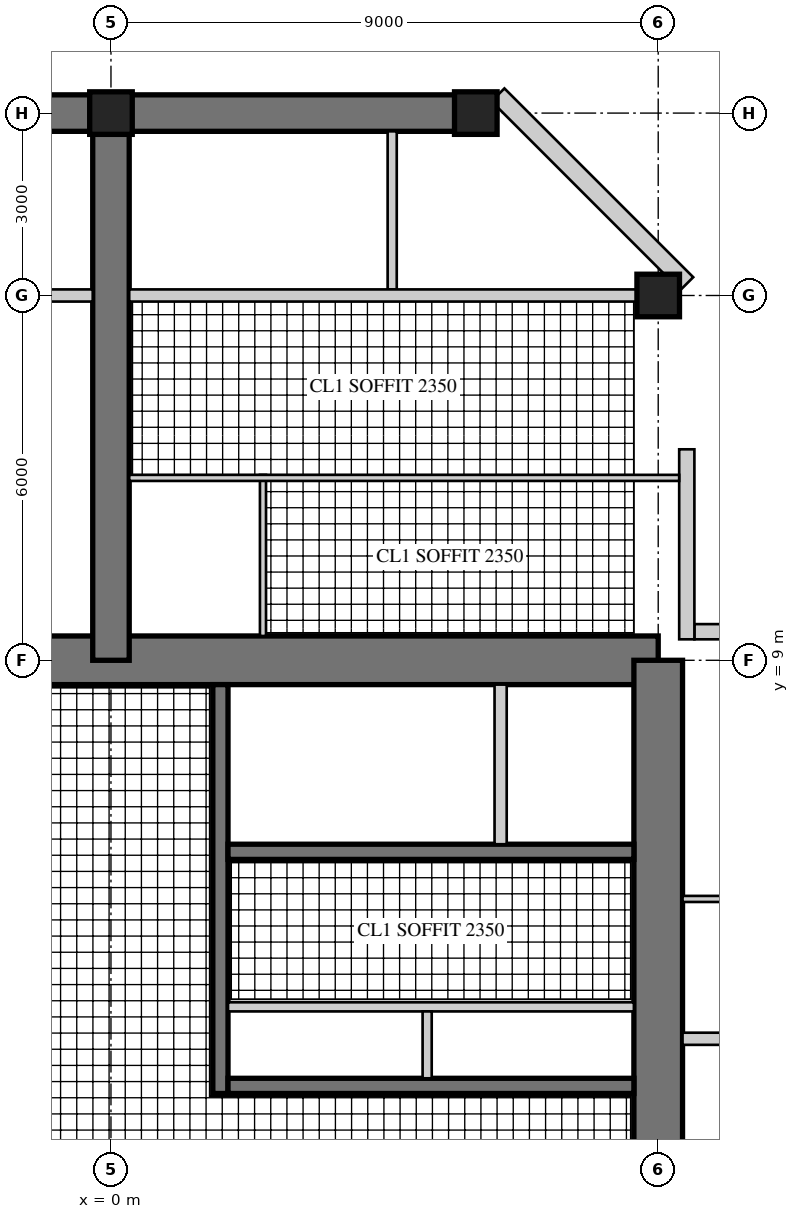
"""IFC4 building model, lengths in metres.
Left out: names, types, materials, properties, quantities, classifications, styles, units other than length and angle.
Written with IfcOpenShell. Run it as: python <this file> out.ifc"""

import sys

from ifc_helpers import new_model, si_unit, direction, frame, frame_2d, origin, origin_2d, place, context, subcontext, project, spatial, rectangle, hollow_rectangle, extrude, element, fill, save


model = new_model("IFC4")
c1 = context("Model", 3, precision=1e-05, world=origin(), true_north=direction((0.0, 1.0)))
c2 = subcontext(c1, "Body", "Model", "MODEL_VIEW")
j1 = project(units=[si_unit("LENGTHUNIT", "METRE"), si_unit("PLANEANGLEUNIT", "RADIAN")], contexts=[c1])
p1 = place(None, origin())
s1 = spatial("IfcSite", under=j1, at=p1, CompositionType="ELEMENT")
p2 = place(p1, origin())
s2 = spatial("IfcBuilding", under=s1, at=p2, CompositionType="ELEMENT")
p3 = place(p2, frame((0.0, 0.0, 278.1)))
s3 = spatial("IfcBuildingStorey", under=s2, at=p3, CompositionType="ELEMENT", Elevation=278.1)
p4 = place(p3, frame((9.0, 9.0, 0.0), z_axis=(0.0, 0.0, 1.0), x_axis=(-1.0, 0.0, 0.0)))
e1 = element("IfcWall", 1, at=p4, inside=s3, PredefinedType="SHEAR", context=c2, shape_type="SweptSolid", body=[
    extrude(rectangle(XDim=18.0, YDim=0.8, at=frame_2d((9.0, 0.0))), origin(), (0.0, 0.0, 1.0), 3.4),
])
p5 = place(p4, frame((9.8, 0.0, 0.0)))
e2 = element("IfcOpeningElement", 2, at=p5, cuts=e1, PredefinedType="OPENING", context=c2, shape_type="SweptSolid", body=[
    extrude(rectangle(XDim=1.0, YDim=2.4, at=frame_2d((0.5, 1.2))), frame((0.0, 0.41, 0.0), z_axis=(0.0, -1.0, 0.0), x_axis=(1.0, 0.0, 0.0)), (0.0, 0.0, 1.0), 0.82),
])
p6 = place(p3, frame((9.0, -9.0, 0.0), z_axis=(0.0, 0.0, 1.0), x_axis=(0.0, 1.0, 0.0)))
e3 = element("IfcWall", 3, at=p6, inside=s3, PredefinedType="SHEAR", context=c2, shape_type="SweptSolid", body=[
    extrude(rectangle(XDim=18.0, YDim=0.8, at=frame_2d((9.0, 0.0))), origin(), (0.0, 0.0, 1.0), 3.4),
])
p7 = place(p6, frame((9.8, 0.0, 0.0)))
e4 = element("IfcOpeningElement", 4, at=p7, cuts=e3, PredefinedType="OPENING", context=c2, shape_type="SweptSolid", body=[
    extrude(rectangle(XDim=1.0, YDim=2.4, at=frame_2d((0.5, 1.2))), frame((0.0, 0.41, 0.0), z_axis=(0.0, -1.0, 0.0), x_axis=(1.0, 0.0, 0.0)), (0.0, 0.0, 1.0), 0.82),
])
p8 = place(p3, frame((1.8, 1.875, 0.0), z_axis=(0.0, 0.0, 1.0), x_axis=(0.0, 1.0, 0.0)))
e5 = element("IfcWall", 5, at=p8, inside=s3, PredefinedType="SHEAR", context=c2, shape_type="SweptSolid", body=[
    extrude(rectangle(XDim=6.725, YDim=0.25, at=frame_2d((3.363, 0.0))), origin(), (0.0, 0.0, 1.0), 3.4),
])
p9 = place(p8, frame((1.875, 0.0, 0.0)))
e6 = element("IfcOpeningElement", 6, at=p9, cuts=e5, PredefinedType="OPENING", context=c2, shape_type="SweptSolid", body=[
    extrude(rectangle(XDim=1.6, YDim=2.4, at=frame_2d((0.8, 1.2))), frame((0.0, 0.135, 0.0), z_axis=(0.0, -1.0, 0.0), x_axis=(1.0, 0.0, 0.0)), (0.0, 0.0, 1.0), 0.27),
])
p10 = place(p3, frame((1.925, 2.0, 0.0), z_axis=(0.0, 0.0, 1.0), x_axis=(1.0, 0.0, 0.0)))
e7 = element("IfcWall", 7, at=p10, inside=s3, PredefinedType="SHEAR", context=c2, shape_type="SweptSolid", body=[
    extrude(rectangle(XDim=6.675, YDim=0.25, at=frame_2d((3.337, 0.0))), origin(), (0.0, 0.0, 1.0), 3.4),
])
p11 = place(p3, frame((1.925, 5.85, 0.0), z_axis=(0.0, 0.0, 1.0), x_axis=(1.0, 0.0, 0.0)))
e8 = element("IfcWall", 8, at=p11, inside=s3, PredefinedType="SHEAR", context=c2, shape_type="SweptSolid", body=[
    extrude(rectangle(XDim=6.675, YDim=0.25, at=frame_2d((3.337, 0.0))), origin(), (0.0, 0.0, 1.0), 3.4),
])
p12 = place(p11, frame((0.546, 0.0, 0.0)))
e9 = element("IfcOpeningElement", 9, at=p12, cuts=e8, PredefinedType="OPENING", context=c2, shape_type="SweptSolid", body=[
    extrude(rectangle(XDim=1.0, YDim=2.1, at=frame_2d((0.5, 1.05))), frame((0.0, 0.135, 0.0), z_axis=(0.0, -1.0, 0.0), x_axis=(1.0, 0.0, 0.0)), (0.0, 0.0, 1.0), 0.27),
])
p13 = place(p11, frame((5.129, 0.0, 0.0)))
e10 = element("IfcOpeningElement", 10, at=p13, cuts=e8, PredefinedType="OPENING", context=c2, shape_type="SweptSolid", body=[
    extrude(rectangle(XDim=1.0, YDim=2.1, at=frame_2d((0.5, 1.05))), frame((0.0, 0.135, 0.0), z_axis=(0.0, -1.0, 0.0), x_axis=(1.0, 0.0, 0.0)), (0.0, 0.0, 1.0), 0.27),
])
p14 = place(p3, frame((1.925, 3.3, 0.0), z_axis=(0.0, 0.0, 1.0), x_axis=(1.0, 0.0, 0.0)))
e11 = element("IfcWall", 11, at=p14, inside=s3, PredefinedType="PARTITIONING", context=c2, shape_type="SweptSolid", body=[
    extrude(rectangle(XDim=6.675, YDim=0.15, at=frame_2d((3.337, 0.0))), origin(), (0.0, 0.0, 1.0), 3.4),
])
p15 = place(p14, frame((0.075, 0.0, 0.0)))
e12 = element("IfcOpeningElement", 12, at=p15, cuts=e11, PredefinedType="OPENING", context=c2, shape_type="SweptSolid", body=[
    extrude(rectangle(XDim=0.8, YDim=2.1, at=frame_2d((0.4, 1.05))), frame((0.0, 0.085, 0.0), z_axis=(0.0, -1.0, 0.0), x_axis=(1.0, 0.0, 0.0)), (0.0, 0.0, 1.0), 0.17),
])
p16 = place(p14, frame((3.675, 0.0, 0.0)))
e13 = element("IfcOpeningElement", 13, at=p16, cuts=e11, PredefinedType="OPENING", context=c2, shape_type="SweptSolid", body=[
    extrude(rectangle(XDim=0.8, YDim=2.1, at=frame_2d((0.4, 1.05))), frame((0.0, 0.085, 0.0), z_axis=(0.0, -1.0, 0.0), x_axis=(1.0, 0.0, 0.0)), (0.0, 0.0, 1.0), 0.17),
])
p17 = place(p3, frame((5.2, 2.125, 0.0), z_axis=(0.0, 0.0, 1.0), x_axis=(0.0, 1.0, 0.0)))
e14 = element("IfcWall", 14, at=p17, inside=s3, PredefinedType="PARTITIONING", context=c2, shape_type="SweptSolid", body=[
    extrude(rectangle(XDim=1.1, YDim=0.15, at=frame_2d((0.55, 0.0))), origin(), (0.0, 0.0, 1.0), 3.4),
])
p18 = place(p3, frame((6.408, 5.975, 0.0), z_axis=(0.0, 0.0, 1.0), x_axis=(0.0, 1.0, 0.0)))
e15 = element("IfcWall", 15, at=p18, inside=s3, PredefinedType="PARTITIONING", context=c2, shape_type="SweptSolid", body=[
    extrude(rectangle(XDim=2.625, YDim=0.2, at=frame_2d((1.312, 0.0))), origin(), (0.0, 0.0, 1.0), 3.4),
])
p19 = place(p3, frame((0.0, 9.0, 0.0), z_axis=(0.0, 0.0, 1.0), x_axis=(0.0, 1.0, 0.0)))
e16 = element("IfcWall", 16, at=p19, inside=s3, PredefinedType="SHEAR", context=c2, shape_type="SweptSolid", body=[
    extrude(rectangle(XDim=9.0, YDim=0.6, at=frame_2d((4.5, 0.0))), origin(), (0.0, 0.0, 1.0), 3.4),
])
p20 = place(p19, frame((3.8, 0.0, 0.0)))
e17 = element("IfcOpeningElement", 17, at=p20, cuts=e16, PredefinedType="OPENING", context=c2, shape_type="SweptSolid", body=[
    extrude(rectangle(XDim=1.0, YDim=2.15, at=frame_2d((0.5, 1.075))), frame((0.0, 0.31, 0.0), z_axis=(0.0, -1.0, 0.0), x_axis=(1.0, 0.0, 0.0)), (0.0, 0.0, 1.0), 0.62),
])
p21 = place(p19, frame((7.0, 0.0, 0.0)))
e18 = element("IfcOpeningElement", 18, at=p21, cuts=e16, PredefinedType="OPENING", context=c2, shape_type="SweptSolid", body=[
    extrude(rectangle(XDim=1.0, YDim=2.2, at=frame_2d((0.5, 1.1))), frame((0.0, 0.31, 0.0), z_axis=(0.0, -1.0, 0.0), x_axis=(1.0, 0.0, 0.0)), (0.0, 0.0, 1.0), 0.62),
])
p22 = place(p3, frame((6.0, 18.0, 0.0), z_axis=(0.0, 0.0, 1.0), x_axis=(-1.0, 0.0, 0.0)))
e19 = element("IfcWall", 19, at=p22, inside=s3, PredefinedType="SHEAR", context=c2, shape_type="SweptSolid", body=[
    extrude(rectangle(XDim=12.0, YDim=0.6, at=frame_2d((6.0, 0.0))), origin(), (0.0, 0.0, 1.0), 3.4),
])
p23 = place(p22, frame((1.625, 0.0, 0.6)))
e20 = element("IfcOpeningElement", 20, at=p23, cuts=e19, PredefinedType="OPENING", context=c2, shape_type="SweptSolid", body=[
    extrude(rectangle(XDim=3.0, YDim=2.4, at=frame_2d((1.5, 1.2))), frame((0.0, 0.31, 0.0), z_axis=(0.0, -1.0, 0.0), x_axis=(1.0, 0.0, 0.0)), (0.0, 0.0, 1.0), 0.62),
])
p24 = place(p22, frame((7.375, 0.0, 0.6)))
e21 = element("IfcOpeningElement", 21, at=p24, cuts=e19, PredefinedType="OPENING", context=c2, shape_type="SweptSolid", body=[
    extrude(rectangle(XDim=3.0, YDim=2.4, at=frame_2d((1.5, 1.2))), frame((0.0, 0.31, 0.0), z_axis=(0.0, -1.0, 0.0), x_axis=(1.0, 0.0, 0.0)), (0.0, 0.0, 1.0), 0.62),
])
for number, where, z_axis, x_axis in (
    (22, (9.0, 15.0, 0.0), (0.0, 0.0, 1.0), (1.0, 0.0, 0.0)),
    (23, (6.0, 18.0, 0.0), (0.0, 0.0, 1.0), (1.0, 0.0, 0.0)),
    (24, (0.0, 18.0, 0.0), (0.0, 0.0, 1.0), (1.0, 0.0, 0.0)),
):
    element("IfcColumn", number, at=place(p3, frame(where, z_axis=z_axis, x_axis=x_axis)), inside=s3, PredefinedType="COLUMN", context=c2, shape_type="SweptSolid", body=[
        extrude(rectangle(XDim=0.7, YDim=0.7, at=origin_2d()), origin(), (0.0, 0.0, 1.0), 3.4),
    ])
p25 = place(p3, frame((12.47, 9.47, 0.0), z_axis=(0.0, 0.0, 1.0), x_axis=(-1.0, 0.0, 0.0)))
e25 = element("IfcWall", 25, at=p25, inside=s3, PredefinedType="SOLIDWALL", context=c2, shape_type="SweptSolid", body=[
    extrude(rectangle(XDim=2.875, YDim=0.25, at=frame_2d((1.438, 0.0))), origin(), (0.0, 0.0, 1.0), 3.22),
])
p26 = place(p25, frame((0.6, 0.0, 0.0)))
e26 = element("IfcOpeningElement", 26, at=p26, cuts=e25, PredefinedType="OPENING", context=c2, shape_type="SweptSolid", body=[
    extrude(rectangle(XDim=1.0, YDim=2.2, at=frame_2d((0.5, 1.1))), frame((0.0, 0.135, 0.0), z_axis=(0.0, -1.0, 0.0), x_axis=(1.0, 0.0, 0.0)), (0.0, 0.0, 1.0), 0.27),
])
p27 = place(p3, frame((9.47, 9.345, 0.0), z_axis=(0.0, 0.0, 1.0), x_axis=(0.0, 1.0, 0.0)))
e27 = element("IfcWall", 27, at=p27, inside=s3, PredefinedType="SOLIDWALL", context=c2, shape_type="SweptSolid", body=[
    extrude(rectangle(XDim=3.125, YDim=0.25, at=frame_2d((1.562, 0.0))), origin(), (0.0, 0.0, 1.0), 3.22),
])
p28 = place(p27, frame((0.6, 0.0, 0.0)))
e28 = element("IfcOpeningElement", 28, at=p28, cuts=e27, PredefinedType="OPENING", context=c2, shape_type="SweptSolid", body=[
    extrude(rectangle(XDim=1.0, YDim=2.2, at=frame_2d((0.5, 1.1))), frame((0.0, 0.135, 0.0), z_axis=(0.0, -1.0, 0.0), x_axis=(1.0, 0.0, 0.0)), (0.0, 0.0, 1.0), 0.27),
])
p29 = place(p3, frame((9.47, 15.195, 0.0), z_axis=(0.0, 0.0, 1.0), x_axis=(-0.70707898447, 0.707134576811, 0.0)))
e29 = element("IfcWall", 29, at=p29, inside=s3, PredefinedType="SOLIDWALL", context=c2, shape_type="SweptSolid", body=[
    extrude(rectangle(XDim=4.392, YDim=0.3, at=frame_2d((2.196, 0.0))), origin(), (0.0, 0.0, 1.0), 3.22),
])
p30 = place(p29, frame((1.746, 0.0, 0.3)))
e30 = element("IfcOpeningElement", 30, at=p30, cuts=e29, PredefinedType="OPENING", context=c2, shape_type="SweptSolid", body=[
    extrude(rectangle(XDim=0.9, YDim=2.4, at=frame_2d((0.45, 1.2))), frame((0.0, 0.16, 0.0), z_axis=(0.0, -1.0, 0.0), x_axis=(1.0, 0.0, 0.0)), (0.0, 0.0, 1.0), 0.32),
])
p31 = place(p3, frame((2.5, 9.4, 0.0), z_axis=(0.0, 0.0, 1.0), x_axis=(0.0, 1.0, 0.0)))
e31 = element("IfcWall", 31, at=p31, inside=s3, PredefinedType="PARTITIONING", context=c2, shape_type="SweptSolid", body=[
    extrude(rectangle(XDim=2.65, YDim=0.1, at=frame_2d((1.325, 0.0))), origin(), (0.0, 0.0, 1.0), 3.22),
])
p32 = place(p3, frame((9.345, 12.0, 0.0), z_axis=(0.0, 0.0, 1.0), x_axis=(-1.0, 0.0, 0.0)))
e32 = element("IfcWall", 32, at=p32, inside=s3, PredefinedType="PARTITIONING", context=c2, shape_type="SweptSolid", body=[
    extrude(rectangle(XDim=9.045, YDim=0.1, at=frame_2d((4.522, 0.0))), origin(), (0.0, 0.0, 1.0), 3.22),
])
p33 = place(p32, frame((5.495, 0.0, 0.0)))
e33 = element("IfcOpeningElement", 33, at=p33, cuts=e32, PredefinedType="OPENING", context=c2, shape_type="SweptSolid", body=[
    extrude(rectangle(XDim=0.9, YDim=2.1, at=frame_2d((0.45, 1.05))), frame((0.0, 0.06, 0.0), z_axis=(0.0, -1.0, 0.0), x_axis=(1.0, 0.0, 0.0)), (0.0, 0.0, 1.0), 0.12),
])
p34 = place(p32, frame((7.595, 0.0, 0.0)))
e34 = element("IfcOpeningElement", 34, at=p34, cuts=e32, PredefinedType="OPENING", context=c2, shape_type="SweptSolid", body=[
    extrude(rectangle(XDim=0.9, YDim=2.1, at=frame_2d((0.45, 1.05))), frame((0.0, 0.06, 0.0), z_axis=(0.0, -1.0, 0.0), x_axis=(1.0, 0.0, 0.0)), (0.0, 0.0, 1.0), 0.12),
])
p35 = place(p3, frame((4.625, 15.1, 0.0), z_axis=(0.0, 0.0, 1.0), x_axis=(0.0, 1.0, 0.0)))
e35 = element("IfcWall", 35, at=p35, inside=s3, PredefinedType="PARTITIONING", context=c2, shape_type="SweptSolid", body=[
    extrude(rectangle(XDim=2.6, YDim=0.15, at=frame_2d((1.3, 0.0))), origin(), (0.0, 0.0, 1.0), 3.22),
])
p36 = place(p35, frame((0.6, 0.0, 0.0)))
e36 = element("IfcOpeningElement", 36, at=p36, cuts=e35, PredefinedType="OPENING", context=c2, shape_type="SweptSolid", body=[
    extrude(rectangle(XDim=1.0, YDim=2.1, at=frame_2d((0.5, 1.05))), frame((0.0, 0.085, 0.0), z_axis=(0.0, -1.0, 0.0), x_axis=(1.0, 0.0, 0.0)), (0.0, 0.0, 1.0), 0.17),
])
p37 = place(p3, frame((8.65, 15.0, 0.0), z_axis=(0.0, 0.0, 1.0), x_axis=(-1.0, 0.0, 0.0)))
e37 = element("IfcWall", 37, at=p37, inside=s3, PredefinedType="SOLIDWALL", context=c2, shape_type="SweptSolid", body=[
    extrude(rectangle(XDim=8.35, YDim=0.2, at=frame_2d((4.175, 0.0))), origin(), (0.0, 0.0, 1.0), 2.52),
])
p38 = place(p3, frame((-0.3, 15.0, 0.0), z_axis=(0.0, 0.0, 1.0), x_axis=(-1.0, 0.0, 0.0)))
e38 = element("IfcWall", 38, at=p38, inside=s3, PredefinedType="SOLIDWALL", context=c2, shape_type="SweptSolid", body=[
    extrude(rectangle(XDim=8.35, YDim=0.2, at=frame_2d((4.175, 0.0))), origin(), (0.0, 0.0, 1.0), 2.52),
])
p39 = place(p38, frame((0.4, 0.0, 0.0)))
e39 = element("IfcOpeningElement", 39, at=p39, cuts=e38, PredefinedType="OPENING", context=c2, shape_type="SweptSolid", body=[
    extrude(rectangle(XDim=1.0, YDim=2.2, at=frame_2d((0.5, 1.1))), frame((0.0, 0.11, 0.0), z_axis=(0.0, -1.0, 0.0), x_axis=(1.0, 0.0, 0.0)), (0.0, 0.0, 1.0), 0.22),
])
p40 = place(p3, frame((9.4, 5.075, 0.0), z_axis=(0.0, 0.0, 1.0), x_axis=(1.0, 0.0, 0.0)))
e40 = element("IfcWall", 40, at=p40, inside=s3, PredefinedType="PARTITIONING", context=c2, shape_type="SweptSolid", body=[
    extrude(rectangle(XDim=3.25, YDim=0.1, at=frame_2d((1.625, 0.0))), origin(), (0.0, 0.0, 1.0), 3.22),
])
p41 = place(p3, frame((9.4, 2.775, 0.0), z_axis=(0.0, 0.0, 1.0), x_axis=(1.0, 0.0, 0.0)))
e41 = element("IfcWall", 41, at=p41, inside=s3, PredefinedType="SOLIDWALL", context=c2, shape_type="SweptSolid", body=[
    extrude(rectangle(XDim=5.6, YDim=0.2, at=frame_2d((2.8, 0.0))), origin(), (0.0, 0.0, 1.0), 3.22),
])
p42 = place(p41, frame((3.75, 0.0, 0.0)))
e42 = element("IfcOpeningElement", 42, at=p42, cuts=e41, PredefinedType="OPENING", context=c2, shape_type="SweptSolid", body=[
    extrude(rectangle(XDim=1.0, YDim=2.15, at=frame_2d((0.5, 1.075))), frame((0.0, 0.11, 0.0), z_axis=(0.0, -1.0, 0.0), x_axis=(1.0, 0.0, 0.0)), (0.0, 0.0, 1.0), 0.22),
])
p43 = place(p28, origin())
e43 = element("IfcDoor", 43, at=p43, inside=s3, OperationType="SINGLE_SWING_LEFT", PredefinedType="DOOR", context=c2, shape_type="SweptSolid", body=[
    extrude(hollow_rectangle(XDim=1.0, YDim=2.2, WallThickness=0.06, at=frame_2d((0.5, 1.1))), frame((0.0, 0.025, 0.0), z_axis=(0.0, -1.0, 0.0), x_axis=(1.0, 0.0, 0.0)), (0.0, 0.0, 1.0), 0.05),
    extrude(rectangle(XDim=0.879, YDim=2.079, at=frame_2d((0.5, 1.1))), frame((0.0, 0.025, 0.0), z_axis=(0.0, -1.0, 0.0), x_axis=(1.0, 0.0, 0.0)), (0.0, 0.0, 1.0), 0.05),
])
fill(e28, e43)
p44 = place(p30, origin())
e44 = element("IfcWindow", 44, at=p44, inside=s3, PartitioningType="SINGLE_PANEL", PredefinedType="WINDOW", context=c2, shape_type="SweptSolid", body=[
    extrude(hollow_rectangle(XDim=0.9, YDim=2.4, WallThickness=0.06, at=frame_2d((0.45, 1.2))), frame((0.0, 0.03, 0.0), z_axis=(0.0, -1.0, 0.0), x_axis=(1.0, 0.0, 0.0)), (0.0, 0.0, 1.0), 0.06),
    extrude(rectangle(XDim=0.779, YDim=2.279, at=frame_2d((0.45, 1.2))), frame((0.0, 0.03, 0.0), z_axis=(0.0, -1.0, 0.0), x_axis=(1.0, 0.0, 0.0)), (0.0, 0.0, 1.0), 0.06),
])
fill(e30, e44)
p45 = place(p23, origin())
e45 = element("IfcWindow", 45, at=p45, inside=s3, PartitioningType="SINGLE_PANEL", PredefinedType="WINDOW", context=c2, shape_type="SweptSolid", body=[
    extrude(hollow_rectangle(XDim=3.0, YDim=2.4, WallThickness=0.06, at=frame_2d((1.5, 1.2))), frame((0.0, 0.03, 0.0), z_axis=(0.0, -1.0, 0.0), x_axis=(1.0, 0.0, 0.0)), (0.0, 0.0, 1.0), 0.06),
    extrude(rectangle(XDim=2.879, YDim=2.279, at=frame_2d((1.5, 1.2))), frame((0.0, 0.03, 0.0), z_axis=(0.0, -1.0, 0.0), x_axis=(1.0, 0.0, 0.0)), (0.0, 0.0, 1.0), 0.06),
])
fill(e20, e45)
p46 = place(p33, origin())
e46 = element("IfcDoor", 46, at=p46, inside=s3, OperationType="SINGLE_SWING_RIGHT", PredefinedType="DOOR", context=c2, shape_type="SweptSolid", body=[
    extrude(rectangle(XDim=0.9, YDim=2.1, at=frame_2d((0.45, 1.05))), frame((0.0, 0.025, 0.0), z_axis=(0.0, -1.0, 0.0), x_axis=(1.0, 0.0, 0.0)), (0.0, 0.0, 1.0), 0.05),
])
fill(e33, e46)
p47 = place(p34, origin())
e47 = element("IfcDoor", 47, at=p47, inside=s3, OperationType="SINGLE_SWING_RIGHT", PredefinedType="DOOR", context=c2, shape_type="SweptSolid", body=[
    extrude(rectangle(XDim=0.9, YDim=2.1, at=frame_2d((0.45, 1.05))), frame((0.0, 0.025, 0.0), z_axis=(0.0, -1.0, 0.0), x_axis=(1.0, 0.0, 0.0)), (0.0, 0.0, 1.0), 0.05),
])
fill(e34, e47)
p48 = place(p36, frame((1.0, 0.0, 0.0), z_axis=(0.0, 0.0, 1.0), x_axis=(-1.0, 0.0, 0.0)))
e48 = element("IfcDoor", 48, at=p48, inside=s3, OperationType="SINGLE_SWING_RIGHT", PredefinedType="DOOR", context=c2, shape_type="SweptSolid", body=[
    extrude(rectangle(XDim=1.0, YDim=2.1, at=frame_2d((0.5, 1.05))), frame((0.0, 0.025, 0.0), z_axis=(0.0, -1.0, 0.0), x_axis=(1.0, 0.0, 0.0)), (0.0, 0.0, 1.0), 0.05),
])
fill(e36, e48)
p49 = place(p39, frame((1.0, 0.0, 0.0), z_axis=(0.0, 0.0, 1.0), x_axis=(-1.0, 0.0, 0.0)))
e49 = element("IfcDoor", 49, at=p49, inside=s3, OperationType="SINGLE_SWING_RIGHT", PredefinedType="DOOR", context=c2, shape_type="SweptSolid", body=[
    extrude(rectangle(XDim=1.0, YDim=2.2, at=frame_2d((0.5, 1.1))), frame((0.0, 0.025, 0.0), z_axis=(0.0, -1.0, 0.0), x_axis=(1.0, 0.0, 0.0)), (0.0, 0.0, 1.0), 0.05),
])
fill(e39, e49)
p50 = place(p20, frame((1.0, 0.0, 0.0), z_axis=(0.0, 0.0, 1.0), x_axis=(-1.0, 0.0, 0.0)))
e50 = element("IfcDoor", 50, at=p50, inside=s3, OperationType="SINGLE_SWING_RIGHT", PredefinedType="DOOR", context=c2, shape_type="SweptSolid", body=[
    extrude(rectangle(XDim=1.0, YDim=2.15, at=frame_2d((0.5, 1.075))), frame((0.0, 0.025, 0.0), z_axis=(0.0, -1.0, 0.0), x_axis=(1.0, 0.0, 0.0)), (0.0, 0.0, 1.0), 0.05),
])
fill(e17, e50)
p51 = place(p21, origin())
e51 = element("IfcDoor", 51, at=p51, inside=s3, OperationType="SINGLE_SWING_RIGHT", PredefinedType="DOOR", context=c2, shape_type="SweptSolid", body=[
    extrude(rectangle(XDim=1.0, YDim=2.2, at=frame_2d((0.5, 1.1))), frame((0.0, 0.025, 0.0), z_axis=(0.0, -1.0, 0.0), x_axis=(1.0, 0.0, 0.0)), (0.0, 0.0, 1.0), 0.05),
])
fill(e18, e51)
p52 = place(p5, origin())
e52 = element("IfcDoor", 52, at=p52, inside=s3, OperationType="SINGLE_SWING_RIGHT", PredefinedType="DOOR", context=c2, shape_type="SweptSolid", body=[
    extrude(rectangle(XDim=1.0, YDim=2.4, at=frame_2d((0.5, 1.2))), frame((0.0, 0.055, 0.0), z_axis=(0.0, -1.0, 0.0), x_axis=(1.0, 0.0, 0.0)), (0.0, 0.0, 1.0), 0.05),
])
fill(e2, e52)
p53 = place(p7, origin())
e53 = element("IfcDoor", 53, at=p53, inside=s3, OperationType="SINGLE_SWING_RIGHT", PredefinedType="DOOR", context=c2, shape_type="SweptSolid", body=[
    extrude(rectangle(XDim=1.0, YDim=2.4, at=frame_2d((0.5, 1.2))), frame((0.0, 0.055, 0.0), z_axis=(0.0, -1.0, 0.0), x_axis=(1.0, 0.0, 0.0)), (0.0, 0.0, 1.0), 0.05),
])
fill(e4, e53)
p54 = place(p9, frame((1.6, 0.0, 0.0), z_axis=(0.0, 0.0, 1.0), x_axis=(-1.0, 0.0, 0.0)))
e54 = element("IfcDoor", 54, at=p54, inside=s3, OperationType="DOUBLE_DOOR_SINGLE_SWING", PredefinedType="DOOR", context=c2, shape_type="SweptSolid", body=[
    extrude(rectangle(XDim=1.6, YDim=2.4, at=frame_2d((0.8, 1.2))), frame((0.0, 0.025, 0.0), z_axis=(0.0, -1.0, 0.0), x_axis=(1.0, 0.0, 0.0)), (0.0, 0.0, 1.0), 0.05),
])
fill(e6, e54)
p55 = place(p15, frame((0.8, 0.0, 0.0), z_axis=(0.0, 0.0, 1.0), x_axis=(-1.0, 0.0, 0.0)))
e55 = element("IfcDoor", 55, at=p55, inside=s3, OperationType="SINGLE_SWING_RIGHT", PredefinedType="DOOR", context=c2, shape_type="SweptSolid", body=[
    extrude(rectangle(XDim=0.8, YDim=2.1, at=frame_2d((0.4, 1.05))), frame((0.0, 0.025, 0.0), z_axis=(0.0, -1.0, 0.0), x_axis=(1.0, 0.0, 0.0)), (0.0, 0.0, 1.0), 0.05),
])
fill(e12, e55)
p56 = place(p16, frame((0.8, 0.0, 0.0), z_axis=(0.0, 0.0, 1.0), x_axis=(-1.0, 0.0, 0.0)))
e56 = element("IfcDoor", 56, at=p56, inside=s3, OperationType="SINGLE_SWING_RIGHT", PredefinedType="DOOR", context=c2, shape_type="SweptSolid", body=[
    extrude(rectangle(XDim=0.8, YDim=2.1, at=frame_2d((0.4, 1.05))), frame((0.0, 0.025, 0.0), z_axis=(0.0, -1.0, 0.0), x_axis=(1.0, 0.0, 0.0)), (0.0, 0.0, 1.0), 0.05),
])
fill(e13, e56)
p57 = place(p12, origin())
e57 = element("IfcDoor", 57, at=p57, inside=s3, OperationType="SINGLE_SWING_LEFT", PredefinedType="DOOR", context=c2, shape_type="SweptSolid", body=[
    extrude(rectangle(XDim=1.0, YDim=2.1, at=frame_2d((0.5, 1.05))), frame((0.0, 0.025, 0.0), z_axis=(0.0, -1.0, 0.0), x_axis=(1.0, 0.0, 0.0)), (0.0, 0.0, 1.0), 0.05),
])
fill(e9, e57)
p58 = place(p13, origin())
e58 = element("IfcDoor", 58, at=p58, inside=s3, OperationType="SINGLE_SWING_RIGHT", PredefinedType="DOOR", context=c2, shape_type="SweptSolid", body=[
    extrude(rectangle(XDim=1.0, YDim=2.1, at=frame_2d((0.5, 1.05))), frame((0.0, 0.025, 0.0), z_axis=(0.0, -1.0, 0.0), x_axis=(1.0, 0.0, 0.0)), (0.0, 0.0, 1.0), 0.05),
])
fill(e10, e58)
save(model, sys.argv[1])
